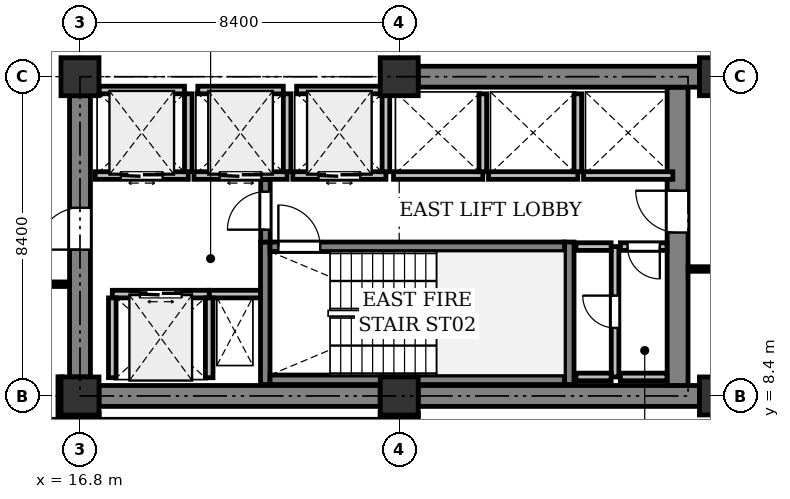
"""IFC4 building model, lengths in metres.
Left out: names, types, materials, properties, quantities, classifications, styles, units other than length and angle.
Written with IfcOpenShell. Run it as: python <this file> out.ifc"""

import sys

from ifc_helpers import new_model, si_unit, direction, frame, frame_2d, origin, origin_2d, place, context, subcontext, project, spatial, rectangle, extrude, element, fill, save


model = new_model("IFC4")
c1 = context("Model", 3, precision=1e-05, world=origin(), true_north=direction((0.0, 1.0)))
c2 = subcontext(c1, "Body", "Model", "MODEL_VIEW")
j1 = project(units=[si_unit("LENGTHUNIT", "METRE"), si_unit("PLANEANGLEUNIT", "RADIAN")], contexts=[c1])
p1 = place(None, origin())
s1 = spatial("IfcSite", under=j1, at=p1, CompositionType="ELEMENT")
p2 = place(p1, origin())
s2 = spatial("IfcBuilding", under=s1, at=p2, CompositionType="ELEMENT")
p3 = place(p2, frame((0.0, 0.0, 171.4)))
s3 = spatial("IfcBuildingStorey", under=s2, at=p3, CompositionType="ELEMENT", Elevation=171.4)
for number, where, z_axis, x_axis in (
    (1, (16.8, 8.4, 0.0), (0.0, 0.0, 1.0), (1.0, 0.0, 0.0)),
    (2, (16.8, 16.8, 0.0), (0.0, 0.0, 1.0), (1.0, 0.0, 0.0)),
    (3, (25.2, 8.4, 0.0), (0.0, 0.0, 1.0), (1.0, 0.0, 0.0)),
    (4, (25.2, 16.8, 0.0), (0.0, 0.0, 1.0), (1.0, 0.0, 0.0)),
    (5, (33.6, 8.4, 0.0), (0.0, 0.0, 1.0), (1.0, 0.0, 0.0)),
    (6, (33.6, 16.8, 0.0), (0.0, 0.0, 1.0), (1.0, 0.0, 0.0)),
):
    element("IfcColumn", number, at=place(p3, frame(where, z_axis=z_axis, x_axis=x_axis)), inside=s3, PredefinedType="COLUMN", context=c2, shape_type="SweptSolid", body=[
        extrude(rectangle(XDim=1.0, YDim=1.0, at=origin_2d()), origin(), (0.0, 0.0, 1.0), 4.1),
    ])
p4 = place(p3, frame((17.3, 8.4, 0.0), z_axis=(0.0, 0.0, 1.0), x_axis=(1.0, 0.0, 0.0)))
e7 = element("IfcWall", 7, at=p4, inside=s3, PredefinedType="SHEAR", context=c2, shape_type="SweptSolid", body=[
    extrude(rectangle(XDim=7.4, YDim=0.55, at=frame_2d((3.7, 0.0))), origin(), (0.0, 0.0, 1.0), 3.825),
])
p5 = place(p3, frame((25.7, 8.4, 0.0), z_axis=(0.0, 0.0, 1.0), x_axis=(1.0, 0.0, 0.0)))
e8 = element("IfcWall", 8, at=p5, inside=s3, PredefinedType="SHEAR", context=c2, shape_type="SweptSolid", body=[
    extrude(rectangle(XDim=7.4, YDim=0.55, at=frame_2d((3.7, 0.0))), origin(), (0.0, 0.0, 1.0), 3.825),
])
p6 = place(p3, frame((32.525, 8.675, 0.0), z_axis=(0.0, 0.0, 1.0), x_axis=(0.0, 1.0, 0.0)))
e9 = element("IfcWall", 9, at=p6, inside=s3, PredefinedType="SHEAR", context=c2, shape_type="SweptSolid", body=[
    extrude(rectangle(XDim=7.85, YDim=0.55, at=frame_2d((3.925, 0.0))), origin(), (0.0, 0.0, 1.0), 3.825),
])
p7 = place(p6, frame((4.025, 0.0, 0.0)))
e10 = element("IfcOpeningElement", 10, at=p7, cuts=e9, PredefinedType="OPENING", context=c2, shape_type="SweptSolid", body=[
    extrude(rectangle(XDim=1.1, YDim=2.15, at=frame_2d((0.55, 1.075))), frame((0.0, 0.285, 0.0), z_axis=(0.0, -1.0, 0.0), x_axis=(1.0, 0.0, 0.0)), (0.0, 0.0, 1.0), 0.57),
])
p8 = place(p3, frame((16.8, 8.9, 0.0), z_axis=(0.0, 0.0, 1.0), x_axis=(0.0, 1.0, 0.0)))
e11 = element("IfcWall", 11, at=p8, inside=s3, PredefinedType="SHEAR", context=c2, shape_type="SweptSolid", body=[
    extrude(rectangle(XDim=7.4, YDim=0.55, at=frame_2d((3.7, 0.0))), origin(), (0.0, 0.0, 1.0), 3.825),
])
p9 = place(p8, frame((3.35, 0.0, 0.0)))
e12 = element("IfcOpeningElement", 12, at=p9, cuts=e11, PredefinedType="OPENING", context=c2, shape_type="SweptSolid", body=[
    extrude(rectangle(XDim=1.1, YDim=2.15, at=frame_2d((0.55, 1.075))), frame((0.0, 0.285, 0.0), z_axis=(0.0, -1.0, 0.0), x_axis=(1.0, 0.0, 0.0)), (0.0, 0.0, 1.0), 0.57),
])
p10 = place(p3, frame((25.7, 16.8, 0.0), z_axis=(0.0, 0.0, 1.0), x_axis=(1.0, 0.0, 0.0)))
e13 = element("IfcWall", 13, at=p10, inside=s3, PredefinedType="SHEAR", context=c2, shape_type="SweptSolid", body=[
    extrude(rectangle(XDim=7.4, YDim=0.55, at=frame_2d((3.7, 0.0))), origin(), (0.0, 0.0, 1.0), 3.825),
])
for number, where, z_axis, x_axis in (
    (14, (21.675, 8.7, 0.0), (0.0, 0.0, 1.0), (0.0, 1.0, 0.0)),
    (15, (29.675, 8.7, 0.0), (0.0, 0.0, 1.0), (0.0, 1.0, 0.0)),
):
    element("IfcWall", number, at=place(p3, frame(where, z_axis=z_axis, x_axis=x_axis)), inside=s3, PredefinedType="SHEAR", context=c2, shape_type="SweptSolid", body=[
        extrude(rectangle(XDim=3.75, YDim=0.25, at=frame_2d((1.875, 0.0))), origin(), (0.0, 0.0, 1.0), 3.825),
    ])
p11 = place(p3, frame((21.8, 8.825, 0.0), z_axis=(0.0, 0.0, 1.0), x_axis=(1.0, 0.0, 0.0)))
e16 = element("IfcWall", 16, at=p11, inside=s3, PredefinedType="SHEAR", context=c2, shape_type="SweptSolid", body=[
    extrude(rectangle(XDim=7.75, YDim=0.25, at=frame_2d((3.875, 0.0))), origin(), (0.0, 0.0, 1.0), 3.825),
])
p12 = place(p3, frame((21.8, 12.325, 0.0), z_axis=(0.0, 0.0, 1.0), x_axis=(1.0, 0.0, 0.0)))
e17 = element("IfcWall", 17, at=p12, inside=s3, PredefinedType="SHEAR", context=c2, shape_type="SweptSolid", body=[
    extrude(rectangle(XDim=7.75, YDim=0.25, at=frame_2d((3.875, 0.0))), origin(), (0.0, 0.0, 1.0), 3.825),
])
p13 = place(p12, frame((0.22, 0.0, 0.0)))
e18 = element("IfcOpeningElement", 18, at=p13, cuts=e17, PredefinedType="OPENING", context=c2, shape_type="SweptSolid", body=[
    extrude(rectangle(XDim=1.1, YDim=2.15, at=frame_2d((0.55, 1.075))), frame((0.0, 0.135, 0.0), z_axis=(0.0, -1.0, 0.0), x_axis=(1.0, 0.0, 0.0)), (0.0, 0.0, 1.0), 0.27),
])
p14 = place(p3, frame((20.2, 11.08, 0.0), z_axis=(0.0, 0.0, 1.0), x_axis=(1.0, 0.0, 0.0)))
e19 = element("IfcWall", 19, at=p14, inside=s3, PredefinedType="PARTITIONING", context=c2, shape_type="SweptSolid", body=[
    extrude(rectangle(XDim=1.35, YDim=0.2, at=frame_2d((0.675, 0.0))), origin(), (0.0, 0.0, 1.0), 3.825),
])
p15 = place(p3, frame((21.68, 12.45, 0.0), z_axis=(0.0, 0.0, 1.0), x_axis=(0.0, 1.0, 0.0)))
e20 = element("IfcWall", 20, at=p15, inside=s3, PredefinedType="SHEAR", context=c2, shape_type="SweptSolid", body=[
    extrude(rectangle(XDim=1.65, YDim=0.25, at=frame_2d((0.825, 0.0))), origin(), (0.0, 0.0, 1.0), 3.825),
])
p16 = place(p15, frame((0.325, 0.0, 0.0)))
e21 = element("IfcOpeningElement", 21, at=p16, cuts=e20, PredefinedType="OPENING", context=c2, shape_type="SweptSolid", body=[
    extrude(rectangle(XDim=1.0, YDim=2.15, at=frame_2d((0.5, 1.075))), frame((0.0, 0.135, 0.0), z_axis=(0.0, -1.0, 0.0), x_axis=(1.0, 0.0, 0.0)), (0.0, 0.0, 1.0), 0.27),
])
p17 = place(p3, frame((17.65, 11.08, 0.0), z_axis=(0.0, 0.0, 1.0), x_axis=(1.0, 0.0, 0.0)))
e22 = element("IfcWall", 22, at=p17, inside=s3, PredefinedType="PARTITIONING", context=c2, shape_type="SweptSolid", body=[
    extrude(rectangle(XDim=2.55, YDim=0.2, at=frame_2d((1.275, 0.0))), origin(), (0.0, 0.0, 1.0), 3.825),
])
p18 = place(p17, frame((0.725, 0.0, 0.0)))
e23 = element("IfcOpeningElement", 23, at=p18, cuts=e22, PredefinedType="OPENING", context=c2, shape_type="SweptSolid", body=[
    extrude(rectangle(XDim=1.1, YDim=2.2, at=frame_2d((0.55, 1.1))), frame((0.0, 0.11, 0.0), z_axis=(0.0, -1.0, 0.0), x_axis=(1.0, 0.0, 0.0)), (0.0, 0.0, 1.0), 0.22),
])
for number, where, z_axis, x_axis in (
    (24, (20.2, 8.88, 0.0), (0.0, 0.0, 1.0), (0.0, 1.0, 0.0)),
    (25, (17.65, 8.88, 0.0), (0.0, 0.0, 1.0), (0.0, 1.0, 0.0)),
):
    element("IfcWall", number, at=place(p3, frame(where, z_axis=z_axis, x_axis=x_axis)), inside=s3, PredefinedType="PARTITIONING", context=c2, shape_type="SweptSolid", body=[
        extrude(rectangle(XDim=2.1, YDim=0.2, at=frame_2d((1.05, 0.0))), origin(), (0.0, 0.0, 1.0), 3.825),
    ])
p19 = place(p3, frame((17.2, 14.2, 0.0), z_axis=(0.0, 0.0, 1.0), x_axis=(1.0, 0.0, 0.0)))
e26 = element("IfcWall", 26, at=p19, inside=s3, PredefinedType="PARTITIONING", context=c2, shape_type="SweptSolid", body=[
    extrude(rectangle(XDim=2.45, YDim=0.2, at=frame_2d((1.225, 0.0))), origin(), (0.0, 0.0, 1.0), 3.825),
])
p20 = place(p19, frame((0.675, 0.0, 0.0)))
e27 = element("IfcOpeningElement", 27, at=p20, cuts=e26, PredefinedType="OPENING", context=c2, shape_type="SweptSolid", body=[
    extrude(rectangle(XDim=1.1, YDim=2.2, at=frame_2d((0.55, 1.1))), frame((0.0, 0.11, 0.0), z_axis=(0.0, -1.0, 0.0), x_axis=(1.0, 0.0, 0.0)), (0.0, 0.0, 1.0), 0.22),
])
p21 = place(p3, frame((19.65, 14.3, 0.0), z_axis=(0.0, 0.0, 1.0), x_axis=(0.0, 1.0, 0.0)))
e28 = element("IfcWall", 28, at=p21, inside=s3, PredefinedType="PARTITIONING", context=c2, shape_type="SweptSolid", body=[
    extrude(rectangle(XDim=2.05, YDim=0.2, at=frame_2d((1.025, 0.0))), origin(), (0.0, 0.0, 1.0), 3.825),
])
p22 = place(p3, frame((17.3, 16.45, 0.0), z_axis=(0.0, 0.0, 1.0), x_axis=(1.0, 0.0, 0.0)))
e29 = element("IfcWall", 29, at=p22, inside=s3, PredefinedType="PARTITIONING", context=c2, shape_type="SweptSolid", body=[
    extrude(rectangle(XDim=2.25, YDim=0.2, at=frame_2d((1.125, 0.0))), origin(), (0.0, 0.0, 1.0), 3.825),
])
p23 = place(p3, frame((19.8, 14.2, 0.0), z_axis=(0.0, 0.0, 1.0), x_axis=(1.0, 0.0, 0.0)))
e30 = element("IfcWall", 30, at=p23, inside=s3, PredefinedType="PARTITIONING", context=c2, shape_type="SweptSolid", body=[
    extrude(rectangle(XDim=2.45, YDim=0.2, at=frame_2d((1.225, 0.0))), origin(), (0.0, 0.0, 1.0), 3.825),
])
p24 = place(p23, frame((0.675, 0.0, 0.0)))
e31 = element("IfcOpeningElement", 31, at=p24, cuts=e30, PredefinedType="OPENING", context=c2, shape_type="SweptSolid", body=[
    extrude(rectangle(XDim=1.1, YDim=2.2, at=frame_2d((0.55, 1.1))), frame((0.0, 0.11, 0.0), z_axis=(0.0, -1.0, 0.0), x_axis=(1.0, 0.0, 0.0)), (0.0, 0.0, 1.0), 0.22),
])
p25 = place(p3, frame((22.25, 14.3, 0.0), z_axis=(0.0, 0.0, 1.0), x_axis=(0.0, 1.0, 0.0)))
e32 = element("IfcWall", 32, at=p25, inside=s3, PredefinedType="PARTITIONING", context=c2, shape_type="SweptSolid", body=[
    extrude(rectangle(XDim=2.05, YDim=0.2, at=frame_2d((1.025, 0.0))), origin(), (0.0, 0.0, 1.0), 3.825),
])
p26 = place(p3, frame((19.9, 16.45, 0.0), z_axis=(0.0, 0.0, 1.0), x_axis=(1.0, 0.0, 0.0)))
e33 = element("IfcWall", 33, at=p26, inside=s3, PredefinedType="PARTITIONING", context=c2, shape_type="SweptSolid", body=[
    extrude(rectangle(XDim=2.25, YDim=0.2, at=frame_2d((1.125, 0.0))), origin(), (0.0, 0.0, 1.0), 3.825),
])
p27 = place(p3, frame((22.4, 14.2, 0.0), z_axis=(0.0, 0.0, 1.0), x_axis=(1.0, 0.0, 0.0)))
e34 = element("IfcWall", 34, at=p27, inside=s3, PredefinedType="PARTITIONING", context=c2, shape_type="SweptSolid", body=[
    extrude(rectangle(XDim=2.45, YDim=0.2, at=frame_2d((1.225, 0.0))), origin(), (0.0, 0.0, 1.0), 3.825),
])
p28 = place(p27, frame((0.675, 0.0, 0.0)))
e35 = element("IfcOpeningElement", 35, at=p28, cuts=e34, PredefinedType="OPENING", context=c2, shape_type="SweptSolid", body=[
    extrude(rectangle(XDim=1.1, YDim=2.2, at=frame_2d((0.55, 1.1))), frame((0.0, 0.11, 0.0), z_axis=(0.0, -1.0, 0.0), x_axis=(1.0, 0.0, 0.0)), (0.0, 0.0, 1.0), 0.22),
])
p29 = place(p3, frame((24.85, 14.3, 0.0), z_axis=(0.0, 0.0, 1.0), x_axis=(0.0, 1.0, 0.0)))
e36 = element("IfcWall", 36, at=p29, inside=s3, PredefinedType="PARTITIONING", context=c2, shape_type="SweptSolid", body=[
    extrude(rectangle(XDim=2.05, YDim=0.2, at=frame_2d((1.025, 0.0))), origin(), (0.0, 0.0, 1.0), 3.825),
])
p30 = place(p3, frame((22.5, 16.45, 0.0), z_axis=(0.0, 0.0, 1.0), x_axis=(1.0, 0.0, 0.0)))
e37 = element("IfcWall", 37, at=p30, inside=s3, PredefinedType="PARTITIONING", context=c2, shape_type="SweptSolid", body=[
    extrude(rectangle(XDim=2.25, YDim=0.2, at=frame_2d((1.125, 0.0))), origin(), (0.0, 0.0, 1.0), 3.825),
])
p31 = place(p3, frame((25.05, 14.2, 0.0), z_axis=(0.0, 0.0, 1.0), x_axis=(1.0, 0.0, 0.0)))
e38 = element("IfcWall", 38, at=p31, inside=s3, PredefinedType="PARTITIONING", context=c2, shape_type="SweptSolid", body=[
    extrude(rectangle(XDim=2.35, YDim=0.2, at=frame_2d((1.175, 0.0))), origin(), (0.0, 0.0, 1.0), 3.825),
])
p32 = place(p3, frame((27.4, 14.3, 0.0), z_axis=(0.0, 0.0, 1.0), x_axis=(0.0, 1.0, 0.0)))
e39 = element("IfcWall", 39, at=p32, inside=s3, PredefinedType="PARTITIONING", context=c2, shape_type="SweptSolid", body=[
    extrude(rectangle(XDim=2.05, YDim=0.2, at=frame_2d((1.025, 0.0))), origin(), (0.0, 0.0, 1.0), 3.825),
])
p33 = place(p3, frame((27.55, 14.2, 0.0), z_axis=(0.0, 0.0, 1.0), x_axis=(1.0, 0.0, 0.0)))
e40 = element("IfcWall", 40, at=p33, inside=s3, PredefinedType="PARTITIONING", context=c2, shape_type="SweptSolid", body=[
    extrude(rectangle(XDim=2.35, YDim=0.2, at=frame_2d((1.175, 0.0))), origin(), (0.0, 0.0, 1.0), 3.825),
])
p34 = place(p3, frame((29.9, 14.3, 0.0), z_axis=(0.0, 0.0, 1.0), x_axis=(0.0, 1.0, 0.0)))
e41 = element("IfcWall", 41, at=p34, inside=s3, PredefinedType="PARTITIONING", context=c2, shape_type="SweptSolid", body=[
    extrude(rectangle(XDim=2.05, YDim=0.2, at=frame_2d((1.025, 0.0))), origin(), (0.0, 0.0, 1.0), 3.825),
])
p35 = place(p3, frame((30.05, 14.2, 0.0), z_axis=(0.0, 0.0, 1.0), x_axis=(1.0, 0.0, 0.0)))
e42 = element("IfcWall", 42, at=p35, inside=s3, PredefinedType="PARTITIONING", context=c2, shape_type="SweptSolid", body=[
    extrude(rectangle(XDim=2.35, YDim=0.2, at=frame_2d((1.175, 0.0))), origin(), (0.0, 0.0, 1.0), 3.825),
])
p36 = place(p3, frame((30.88, 8.9, 0.0), z_axis=(0.0, 0.0, 1.0), x_axis=(0.0, 1.0, 0.0)))
e43 = element("IfcWall", 43, at=p36, inside=s3, PredefinedType="PARTITIONING", context=c2, shape_type="SweptSolid", body=[
    extrude(rectangle(XDim=3.43, YDim=0.2, at=frame_2d((1.715, 0.0))), origin(), (0.0, 0.0, 1.0), 3.825),
])
p37 = place(p36, frame((1.29, 0.0, 0.0)))
e44 = element("IfcOpeningElement", 44, at=p37, cuts=e43, PredefinedType="OPENING", context=c2, shape_type="SweptSolid", body=[
    extrude(rectangle(XDim=0.85, YDim=2.15, at=frame_2d((0.425, 1.075))), frame((0.0, 0.11, 0.0), z_axis=(0.0, -1.0, 0.0), x_axis=(1.0, 0.0, 0.0)), (0.0, 0.0, 1.0), 0.22),
])
for number, where, z_axis, x_axis in (
    (45, (30.776, 12.33, 0.0), (0.0, 0.0, 1.0), (-1.0, 0.0, 0.0)),
    (46, (29.85, 8.9, 0.0), (0.0, 0.0, 1.0), (1.0, 0.0, 0.0)),
):
    element("IfcWall", number, at=place(p3, frame(where, z_axis=z_axis, x_axis=x_axis)), inside=s3, PredefinedType="PARTITIONING", context=c2, shape_type="SweptSolid", body=[
        extrude(rectangle(XDim=0.926, YDim=0.2, at=frame_2d((0.463, 0.0))), origin(), (0.0, 0.0, 1.0), 3.825),
    ])
p38 = place(p3, frame((32.246, 12.33, 0.0), z_axis=(0.0, 0.0, 1.0), x_axis=(-1.0, 0.0, 0.0)))
e47 = element("IfcWall", 47, at=p38, inside=s3, PredefinedType="PARTITIONING", context=c2, shape_type="SweptSolid", body=[
    extrude(rectangle(XDim=1.226, YDim=0.2, at=frame_2d((0.613, 0.0))), origin(), (0.0, 0.0, 1.0), 3.825),
])
p39 = place(p38, frame((0.188, 0.0, 0.0)))
e48 = element("IfcOpeningElement", 48, at=p39, cuts=e47, PredefinedType="OPENING", context=c2, shape_type="SweptSolid", body=[
    extrude(rectangle(XDim=0.85, YDim=2.15, at=frame_2d((0.425, 1.075))), frame((0.0, 0.11, 0.0), z_axis=(0.0, -1.0, 0.0), x_axis=(1.0, 0.0, 0.0)), (0.0, 0.0, 1.0), 0.22),
])
p40 = place(p3, frame((31.02, 8.9, 0.0), z_axis=(0.0, 0.0, 1.0), x_axis=(1.0, 0.0, 0.0)))
e49 = element("IfcWall", 49, at=p40, inside=s3, PredefinedType="PARTITIONING", context=c2, shape_type="SweptSolid", body=[
    extrude(rectangle(XDim=1.226, YDim=0.2, at=frame_2d((0.613, 0.0))), origin(), (0.0, 0.0, 1.0), 3.825),
])
p41 = place(p3, frame((34.261, 11.74, 0.0), z_axis=(0.0, 0.0, 1.0), x_axis=(-1.0, 0.0, 0.0)))
e50 = element("IfcWall", 50, at=p41, inside=s3, PredefinedType="PARTITIONING", context=c2, shape_type="SweptSolid", body=[
    extrude(rectangle(XDim=1.457, YDim=0.12, at=frame_2d((0.729, 0.0))), origin(), (0.0, 0.0, 1.0), 3.371),
])
for number, where, z_axis, x_axis in (
    (51, (25.704, 7.88, 0.0), (0.0, 0.0, 1.0), (-1.0, -0.0, 0.0)),
    (52, (17.304, 7.88, 0.0), (0.0, 0.0, 1.0), (-1.0, -0.0, 0.0)),
):
    element("IfcWall", number, at=place(p3, frame(where, z_axis=z_axis, x_axis=x_axis)), inside=s3, PredefinedType="PARTITIONING", context=c2, shape_type="SweptSolid", body=[
        extrude(rectangle(XDim=1.004, YDim=0.12, at=frame_2d((0.502, 0.0))), origin(), (0.0, 0.0, 1.0), 3.371),
    ])
p42 = place(p3, frame((16.28, 7.9, 0.0), z_axis=(0.0, 0.0, 1.0), x_axis=(0.000486381265, 0.999999881717, 0.0)))
e53 = element("IfcWall", 53, at=p42, inside=s3, PredefinedType="PARTITIONING", context=c2, shape_type="SweptSolid", body=[
    extrude(rectangle(XDim=1.004, YDim=0.12, at=frame_2d((0.502, 0.0))), origin(), (0.0, 0.0, 1.0), 3.365),
])
p43 = place(p3, frame((16.521, 11.34, 0.0), z_axis=(0.0, 0.0, 1.0), x_axis=(-1.0, 0.0, 0.0)))
e54 = element("IfcWall", 54, at=p43, inside=s3, PredefinedType="PARTITIONING", context=c2, shape_type="SweptSolid", body=[
    extrude(rectangle(XDim=2.121, YDim=0.12, at=frame_2d((1.061, 0.0))), origin(), (0.0, 0.0, 1.0), 3.825),
])
p44 = place(p3, frame((10.39, 7.71, 0.0), z_axis=(0.0, 0.0, 1.0), x_axis=(1.0, 0.0, 0.0)))
e55 = element("IfcWall", 55, at=p44, inside=s3, PredefinedType="PARTITIONING", context=c2, shape_type="SweptSolid", body=[
    extrude(rectangle(XDim=5.91, YDim=0.15, at=frame_2d((2.955, 0.0))), origin(), (0.0, 0.0, 1.0), 3.518),
])
p45 = place(p3, frame((17.304, 7.71, 0.0), z_axis=(0.0, 0.0, 1.0), x_axis=(1.0, 0.0, 0.0)))
e56 = element("IfcWall", 56, at=p45, inside=s3, PredefinedType="PARTITIONING", context=c2, shape_type="SweptSolid", body=[
    extrude(rectangle(XDim=7.396, YDim=0.15, at=frame_2d((3.698, 0.0))), origin(), (0.0, 0.0, 1.0), 3.518),
])
p46 = place(p7, origin())
e57 = element("IfcDoor", 57, at=p46, inside=s3, OperationType="SINGLE_SWING_RIGHT", PredefinedType="DOOR", context=c2, shape_type="SweptSolid", body=[
    extrude(rectangle(XDim=1.1, YDim=2.15, at=frame_2d((0.55, 1.075))), frame((0.0, 0.025, 0.0), z_axis=(0.0, -1.0, 0.0), x_axis=(1.0, 0.0, 0.0)), (0.0, 0.0, 1.0), 0.05),
])
fill(e10, e57)
p47 = place(p9, origin())
e58 = element("IfcDoor", 58, at=p47, inside=s3, OperationType="SINGLE_SWING_LEFT", PredefinedType="DOOR", context=c2, shape_type="SweptSolid", body=[
    extrude(rectangle(XDim=1.1, YDim=2.15, at=frame_2d((0.55, 1.075))), frame((0.0, 0.025, 0.0), z_axis=(0.0, -1.0, 0.0), x_axis=(1.0, 0.0, 0.0)), (0.0, 0.0, 1.0), 0.05),
])
fill(e12, e58)
p48 = place(p13, origin())
e59 = element("IfcDoor", 59, at=p48, inside=s3, OperationType="SINGLE_SWING_LEFT", PredefinedType="DOOR", context=c2, shape_type="SweptSolid", body=[
    extrude(rectangle(XDim=1.1, YDim=2.15, at=frame_2d((0.55, 1.075))), frame((0.0, 0.025, 0.0), z_axis=(0.0, -1.0, 0.0), x_axis=(1.0, 0.0, 0.0)), (0.0, 0.0, 1.0), 0.05),
])
fill(e18, e59)
p49 = place(p16, origin())
e60 = element("IfcDoor", 60, at=p49, inside=s3, OperationType="SINGLE_SWING_LEFT", PredefinedType="DOOR", context=c2, shape_type="SweptSolid", body=[
    extrude(rectangle(XDim=1.0, YDim=2.15, at=frame_2d((0.5, 1.075))), frame((0.0, 0.025, 0.0), z_axis=(0.0, -1.0, 0.0), x_axis=(1.0, 0.0, 0.0)), (0.0, 0.0, 1.0), 0.05),
])
fill(e21, e60)
p50 = place(p18, origin())
e61 = element("IfcDoor", 61, at=p50, inside=s3, OperationType="DOUBLE_DOOR_SLIDING", PredefinedType="DOOR", context=c2, shape_type="SweptSolid", body=[
    extrude(rectangle(XDim=1.1, YDim=2.2, at=frame_2d((0.55, 1.1))), frame((0.0, 0.025, 0.0), z_axis=(0.0, -1.0, 0.0), x_axis=(1.0, 0.0, 0.0)), (0.0, 0.0, 1.0), 0.05),
])
fill(e23, e61)
p51 = place(p20, origin())
e62 = element("IfcDoor", 62, at=p51, inside=s3, OperationType="DOUBLE_DOOR_SLIDING", PredefinedType="DOOR", context=c2, shape_type="SweptSolid", body=[
    extrude(rectangle(XDim=1.1, YDim=2.2, at=frame_2d((0.55, 1.1))), frame((0.0, 0.025, 0.0), z_axis=(0.0, -1.0, 0.0), x_axis=(1.0, 0.0, 0.0)), (0.0, 0.0, 1.0), 0.05),
])
fill(e27, e62)
p52 = place(p24, origin())
e63 = element("IfcDoor", 63, at=p52, inside=s3, OperationType="DOUBLE_DOOR_SLIDING", PredefinedType="DOOR", context=c2, shape_type="SweptSolid", body=[
    extrude(rectangle(XDim=1.1, YDim=2.2, at=frame_2d((0.55, 1.1))), frame((0.0, 0.025, 0.0), z_axis=(0.0, -1.0, 0.0), x_axis=(1.0, 0.0, 0.0)), (0.0, 0.0, 1.0), 0.05),
])
fill(e31, e63)
p53 = place(p28, origin())
e64 = element("IfcDoor", 64, at=p53, inside=s3, OperationType="DOUBLE_DOOR_SLIDING", PredefinedType="DOOR", context=c2, shape_type="SweptSolid", body=[
    extrude(rectangle(XDim=1.1, YDim=2.2, at=frame_2d((0.55, 1.1))), frame((0.0, 0.025, 0.0), z_axis=(0.0, -1.0, 0.0), x_axis=(1.0, 0.0, 0.0)), (0.0, 0.0, 1.0), 0.05),
])
fill(e35, e64)
p54 = place(p37, origin())
e65 = element("IfcDoor", 65, at=p54, inside=s3, OperationType="SINGLE_SWING_RIGHT", PredefinedType="DOOR", context=c2, shape_type="SweptSolid", body=[
    extrude(rectangle(XDim=0.85, YDim=2.15, at=frame_2d((0.425, 1.075))), frame((0.0, 0.025, 0.0), z_axis=(0.0, -1.0, 0.0), x_axis=(1.0, 0.0, 0.0)), (0.0, 0.0, 1.0), 0.05),
])
fill(e44, e65)
p55 = place(p39, origin())
e66 = element("IfcDoor", 66, at=p55, inside=s3, OperationType="SINGLE_SWING_LEFT", PredefinedType="DOOR", context=c2, shape_type="SweptSolid", body=[
    extrude(rectangle(XDim=0.85, YDim=2.15, at=frame_2d((0.425, 1.075))), frame((0.0, 0.025, 0.0), z_axis=(0.0, -1.0, 0.0), x_axis=(1.0, 0.0, 0.0)), (0.0, 0.0, 1.0), 0.05),
])
fill(e48, e66)
save(model, sys.argv[1])
